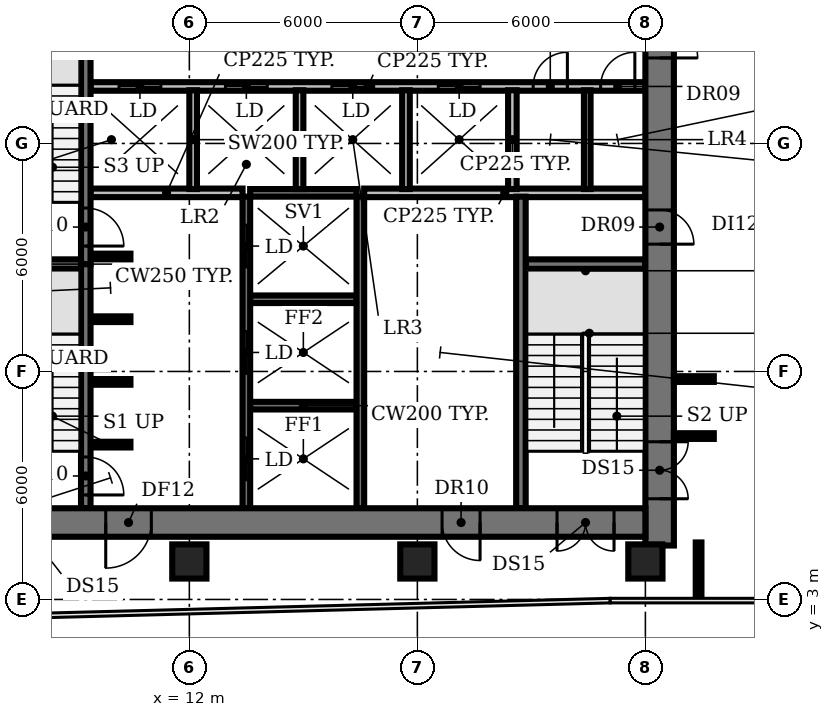
"""IFC4 building model, lengths in metres.
Left out: names, types, materials, properties, quantities, classifications, styles, units other than length and angle.
Written with IfcOpenShell. Run it as: python <this file> out.ifc"""

import sys

from ifc_helpers import new_model, si_unit, direction, frame, frame_2d, origin, origin_2d, place, context, subcontext, project, spatial, rectangle, extrude, element, fill, save


model = new_model("IFC4")
c1 = context("Model", 3, precision=1e-05, world=origin(), true_north=direction((0.0, 1.0)))
c2 = subcontext(c1, "Body", "Model", "MODEL_VIEW")
j1 = project(units=[si_unit("LENGTHUNIT", "METRE"), si_unit("PLANEANGLEUNIT", "RADIAN")], contexts=[c1])
p1 = place(None, origin())
s1 = spatial("IfcSite", under=j1, at=p1, CompositionType="ELEMENT")
p2 = place(p1, origin())
s2 = spatial("IfcBuilding", under=s1, at=p2, CompositionType="ELEMENT")
p3 = place(p2, frame((0.0, 0.0, 104.6)))
s3 = spatial("IfcBuildingStorey", under=s2, at=p3, CompositionType="ELEMENT", Elevation=104.6)
for number, where, z_axis, x_axis in (
    (1, (12.0, 4.0, 0.0), (0.0, 0.0, 1.0), (1.0, 0.0, 0.0)),
    (2, (18.0, 4.0, 0.0), (0.0, 0.0, 1.0), (1.0, 0.0, 0.0)),
    (3, (24.0, 4.0, 0.0), (0.0, 0.0, 1.0), (1.0, 0.0, 0.0)),
):
    element("IfcColumn", number, at=place(p3, frame(where, z_axis=z_axis, x_axis=x_axis)), inside=s3, PredefinedType="COLUMN", context=c2, shape_type="SweptSolid", body=[
        extrude(rectangle(XDim=0.9, YDim=0.9, at=origin_2d()), origin(), (0.0, 0.0, 1.0), 3.85),
    ])
p4 = place(p3, frame((9.4, 7.075, 0.0), z_axis=(0.0, 0.0, 1.0), x_axis=(1.0, 0.0, 0.0)))
e4 = element("IfcWall", 4, at=p4, inside=s3, PredefinedType="SHEAR", context=c2, shape_type="SweptSolid", body=[
    extrude(rectangle(XDim=1.05, YDim=0.15, at=frame_2d((0.525, 0.0))), origin(), (0.0, 0.0, 1.0), 3.85),
])
p5 = place(p3, frame((13.6, 8.1, 0.0), z_axis=(0.0, 0.0, 1.0), x_axis=(1.0, 0.0, 0.0)))
e5 = element("IfcWall", 5, at=p5, inside=s3, PredefinedType="SHEAR", context=c2, shape_type="SweptSolid", body=[
    extrude(rectangle(XDim=2.8, YDim=0.2, at=frame_2d((1.4, 0.0))), origin(), (0.0, 0.0, 1.0), 3.85),
])
for number, where, z_axis, x_axis in (
    (6, (9.4, 8.725, 0.0), (0.0, 0.0, 1.0), (1.0, 0.0, 0.0)),
    (7, (9.4, 10.375, 0.0), (0.0, 0.0, 1.0), (1.0, 0.0, 0.0)),
):
    element("IfcWall", number, at=place(p3, frame(where, z_axis=z_axis, x_axis=x_axis)), inside=s3, PredefinedType="SHEAR", context=c2, shape_type="SweptSolid", body=[
        extrude(rectangle(XDim=1.05, YDim=0.15, at=frame_2d((0.525, 0.0))), origin(), (0.0, 0.0, 1.0), 3.85),
    ])
p6 = place(p3, frame((13.6, 10.9, 0.0), z_axis=(0.0, 0.0, 1.0), x_axis=(1.0, 0.0, 0.0)))
e8 = element("IfcWall", 8, at=p6, inside=s3, PredefinedType="SHEAR", context=c2, shape_type="SweptSolid", body=[
    extrude(rectangle(XDim=2.8, YDim=0.2, at=frame_2d((1.4, 0.0))), origin(), (0.0, 0.0, 1.0), 3.85),
])
for number, where, z_axis, x_axis in (
    (9, (6.0, 11.825, 0.0), (0.0, 0.0, 1.0), (1.0, 0.0, 0.0)),
    (10, (20.85, 11.825, 0.0), (0.0, 0.0, 1.0), (1.0, 0.0, 0.0)),
):
    element("IfcWall", number, at=place(p3, frame(where, z_axis=z_axis, x_axis=x_axis)), inside=s3, PredefinedType="SHEAR", context=c2, shape_type="SweptSolid", body=[
        extrude(rectangle(XDim=3.15, YDim=0.25, at=frame_2d((1.575, 0.0))), origin(), (0.0, 0.0, 1.0), 3.85),
    ])
p7 = place(p3, frame((9.4, 12.025, 0.0), z_axis=(0.0, 0.0, 1.0), x_axis=(1.0, 0.0, 0.0)))
e11 = element("IfcWall", 11, at=p7, inside=s3, PredefinedType="SHEAR", context=c2, shape_type="SweptSolid", body=[
    extrude(rectangle(XDim=1.05, YDim=0.15, at=frame_2d((0.525, 0.0))), origin(), (0.0, 0.0, 1.0), 3.85),
])
p8 = place(p3, frame((9.4, 13.7, 0.0), z_axis=(0.0, 0.0, 1.0), x_axis=(1.0, 0.0, 0.0)))
e12 = element("IfcWall", 12, at=p8, inside=s3, PredefinedType="PARTITIONING", context=c2, shape_type="SweptSolid", body=[
    extrude(rectangle(XDim=4.0, YDim=0.225, at=frame_2d((2.0, 0.0))), origin(), (0.0, 0.0, 1.0), 3.85),
])
p9 = place(p3, frame((13.6, 13.7, 0.0), z_axis=(0.0, 0.0, 1.0), x_axis=(1.0, 0.0, 0.0)))
e13 = element("IfcWall", 13, at=p9, inside=s3, PredefinedType="SHEAR", context=c2, shape_type="SweptSolid", body=[
    extrude(rectangle(XDim=2.8, YDim=0.2, at=frame_2d((1.4, 0.0))), origin(), (0.0, 0.0, 1.0), 3.85),
])
p10 = place(p3, frame((16.6, 13.7, 0.0), z_axis=(0.0, 0.0, 1.0), x_axis=(1.0, 0.0, 0.0)))
e14 = element("IfcWall", 14, at=p10, inside=s3, PredefinedType="PARTITIONING", context=c2, shape_type="SweptSolid", body=[
    extrude(rectangle(XDim=7.4, YDim=0.225, at=frame_2d((3.7, 0.0))), origin(), (0.0, 0.0, 1.0), 3.85),
])
p11 = place(p3, frame((9.4, 16.5, 0.0), z_axis=(0.0, 0.0, 1.0), x_axis=(1.0, 0.0, 0.0)))
e15 = element("IfcWall", 15, at=p11, inside=s3, PredefinedType="PARTITIONING", context=c2, shape_type="SweptSolid", body=[
    extrude(rectangle(XDim=14.6, YDim=0.225, at=frame_2d((7.3, 0.0))), origin(), (0.0, 0.0, 1.0), 3.85),
])
p12 = place(p11, frame((0.75, 0.0, 0.0)))
e16 = element("IfcOpeningElement", 16, at=p12, cuts=e15, PredefinedType="OPENING", context=c2, shape_type="SweptSolid", body=[
    extrude(rectangle(XDim=1.1, YDim=2.1, at=frame_2d((0.55, 1.05))), frame((0.0, 0.123, 0.0), z_axis=(0.0, -1.0, 0.0), x_axis=(1.0, 0.0, 0.0)), (0.0, 0.0, 1.0), 0.245),
])
p13 = place(p11, frame((3.55, 0.0, 0.0)))
e17 = element("IfcOpeningElement", 17, at=p13, cuts=e15, PredefinedType="OPENING", context=c2, shape_type="SweptSolid", body=[
    extrude(rectangle(XDim=1.1, YDim=2.1, at=frame_2d((0.55, 1.05))), frame((0.0, 0.123, 0.0), z_axis=(0.0, -1.0, 0.0), x_axis=(1.0, 0.0, 0.0)), (0.0, 0.0, 1.0), 0.245),
])
p14 = place(p11, frame((6.35, 0.0, 0.0)))
e18 = element("IfcOpeningElement", 18, at=p14, cuts=e15, PredefinedType="OPENING", context=c2, shape_type="SweptSolid", body=[
    extrude(rectangle(XDim=1.1, YDim=2.1, at=frame_2d((0.55, 1.05))), frame((0.0, 0.123, 0.0), z_axis=(0.0, -1.0, 0.0), x_axis=(1.0, 0.0, 0.0)), (0.0, 0.0, 1.0), 0.245),
])
p15 = place(p11, frame((9.15, 0.0, 0.0)))
e19 = element("IfcOpeningElement", 19, at=p15, cuts=e15, PredefinedType="OPENING", context=c2, shape_type="SweptSolid", body=[
    extrude(rectangle(XDim=1.1, YDim=2.1, at=frame_2d((0.55, 1.05))), frame((0.0, 0.123, 0.0), z_axis=(0.0, -1.0, 0.0), x_axis=(1.0, 0.0, 0.0)), (0.0, 0.0, 1.0), 0.245),
])
p16 = place(p11, frame((11.647, 0.0, 0.0)))
e20 = element("IfcOpeningElement", 20, at=p16, cuts=e15, PredefinedType="OPENING", context=c2, shape_type="SweptSolid", body=[
    extrude(rectangle(XDim=0.9, YDim=2.1, at=frame_2d((0.45, 1.05))), frame((0.0, 0.123, 0.0), z_axis=(0.0, -1.0, 0.0), x_axis=(1.0, 0.0, 0.0)), (0.0, 0.0, 1.0), 0.245),
])
p17 = place(p11, frame((13.423, 0.0, 0.0)))
e21 = element("IfcOpeningElement", 21, at=p17, cuts=e15, PredefinedType="OPENING", context=c2, shape_type="SweptSolid", body=[
    extrude(rectangle(XDim=0.9, YDim=2.1, at=frame_2d((0.45, 1.05))), frame((0.0, 0.123, 0.0), z_axis=(0.0, -1.0, 0.0), x_axis=(1.0, 0.0, 0.0)), (0.0, 0.0, 1.0), 0.245),
])
p18 = place(p3, frame((9.275, 11.825, 0.0), z_axis=(0.0, 0.0, 1.0), x_axis=(0.0, -1.0, 0.0)))
e22 = element("IfcWall", 22, at=p18, inside=s3, PredefinedType="SHEAR", context=c2, shape_type="SweptSolid", body=[
    extrude(rectangle(XDim=6.425, YDim=0.25, at=frame_2d((3.212, 0.0))), origin(), (0.0, 0.0, 1.0), 3.85),
])
p19 = place(p18, frame((5.075, 0.0, 0.0)))
e23 = element("IfcOpeningElement", 23, at=p19, cuts=e22, PredefinedType="OPENING", context=c2, shape_type="SweptSolid", body=[
    extrude(rectangle(XDim=1.0, YDim=2.1, at=frame_2d((0.5, 1.05))), frame((0.0, 0.135, 0.0), z_axis=(0.0, -1.0, 0.0), x_axis=(1.0, 0.0, 0.0)), (0.0, 0.0, 1.0), 0.27),
])
p20 = place(p3, frame((9.275, 18.375, 0.0), z_axis=(0.0, 0.0, 1.0), x_axis=(0.0, -1.0, 0.0)))
e24 = element("IfcWall", 24, at=p20, inside=s3, PredefinedType="SHEAR", context=c2, shape_type="SweptSolid", body=[
    extrude(rectangle(XDim=6.55, YDim=0.25, at=frame_2d((3.275, 0.0))), origin(), (0.0, 0.0, 1.0), 3.85),
])
p21 = place(p20, frame((5.075, 0.0, 0.0)))
e25 = element("IfcOpeningElement", 25, at=p21, cuts=e24, PredefinedType="OPENING", context=c2, shape_type="SweptSolid", body=[
    extrude(rectangle(XDim=1.0, YDim=2.1, at=frame_2d((0.5, 1.05))), frame((0.0, 0.135, 0.0), z_axis=(0.0, -1.0, 0.0), x_axis=(1.0, 0.0, 0.0)), (0.0, 0.0, 1.0), 0.27),
])
p22 = place(p3, frame((12.1, 13.8, 0.0), z_axis=(0.0, 0.0, 1.0), x_axis=(0.0, 1.0, 0.0)))
e26 = element("IfcWall", 26, at=p22, inside=s3, PredefinedType="SOLIDWALL", context=c2, shape_type="SweptSolid", body=[
    extrude(rectangle(XDim=2.6, YDim=0.2, at=frame_2d((1.3, 0.0))), origin(), (0.0, 0.0, 1.0), 3.85),
])
p23 = place(p3, frame((13.5, 5.4, 0.0), z_axis=(0.0, 0.0, 1.0), x_axis=(0.0, 1.0, 0.0)))
e27 = element("IfcWall", 27, at=p23, inside=s3, PredefinedType="SHEAR", context=c2, shape_type="SweptSolid", body=[
    extrude(rectangle(XDim=8.2, YDim=0.2, at=frame_2d((4.1, 0.0))), origin(), (0.0, 0.0, 1.0), 3.85),
])
p24 = place(p23, frame((0.75, 0.0, 0.0)))
e28 = element("IfcOpeningElement", 28, at=p24, cuts=e27, PredefinedType="OPENING", context=c2, shape_type="SweptSolid", body=[
    extrude(rectangle(XDim=1.1, YDim=2.1, at=frame_2d((0.55, 1.05))), frame((0.0, 0.11, 0.0), z_axis=(0.0, -1.0, 0.0), x_axis=(1.0, 0.0, 0.0)), (0.0, 0.0, 1.0), 0.22),
])
p25 = place(p23, frame((3.55, 0.0, 0.0)))
e29 = element("IfcOpeningElement", 29, at=p25, cuts=e27, PredefinedType="OPENING", context=c2, shape_type="SweptSolid", body=[
    extrude(rectangle(XDim=1.1, YDim=2.1, at=frame_2d((0.55, 1.05))), frame((0.0, 0.11, 0.0), z_axis=(0.0, -1.0, 0.0), x_axis=(1.0, 0.0, 0.0)), (0.0, 0.0, 1.0), 0.22),
])
p26 = place(p23, frame((6.35, 0.0, 0.0)))
e30 = element("IfcOpeningElement", 30, at=p26, cuts=e27, PredefinedType="OPENING", context=c2, shape_type="SweptSolid", body=[
    extrude(rectangle(XDim=1.1, YDim=2.1, at=frame_2d((0.55, 1.05))), frame((0.0, 0.11, 0.0), z_axis=(0.0, -1.0, 0.0), x_axis=(1.0, 0.0, 0.0)), (0.0, 0.0, 1.0), 0.22),
])
p27 = place(p3, frame((14.9, 13.8, 0.0), z_axis=(0.0, 0.0, 1.0), x_axis=(0.0, 1.0, 0.0)))
e31 = element("IfcWall", 31, at=p27, inside=s3, PredefinedType="SOLIDWALL", context=c2, shape_type="SweptSolid", body=[
    extrude(rectangle(XDim=2.6, YDim=0.2, at=frame_2d((1.3, 0.0))), origin(), (0.0, 0.0, 1.0), 3.85),
])
p28 = place(p3, frame((16.5, 5.4, 0.0), z_axis=(0.0, 0.0, 1.0), x_axis=(0.0, 1.0, 0.0)))
e32 = element("IfcWall", 32, at=p28, inside=s3, PredefinedType="SHEAR", context=c2, shape_type="SweptSolid", body=[
    extrude(rectangle(XDim=8.2, YDim=0.2, at=frame_2d((4.1, 0.0))), origin(), (0.0, 0.0, 1.0), 3.85),
])
p29 = place(p3, frame((17.7, 13.8, 0.0), z_axis=(0.0, 0.0, 1.0), x_axis=(0.0, 1.0, 0.0)))
e33 = element("IfcWall", 33, at=p29, inside=s3, PredefinedType="SOLIDWALL", context=c2, shape_type="SweptSolid", body=[
    extrude(rectangle(XDim=2.6, YDim=0.2, at=frame_2d((1.3, 0.0))), origin(), (0.0, 0.0, 1.0), 3.85),
])
p30 = place(p3, frame((20.5, 13.8, 0.0), z_axis=(0.0, 0.0, 1.0), x_axis=(0.0, 1.0, 0.0)))
e34 = element("IfcWall", 34, at=p30, inside=s3, PredefinedType="PARTITIONING", context=c2, shape_type="SweptSolid", body=[
    extrude(rectangle(XDim=2.6, YDim=0.225, at=frame_2d((1.3, 0.0))), origin(), (0.0, 0.0, 1.0), 3.85),
])
p31 = place(p3, frame((20.725, 5.4, 0.0), z_axis=(0.0, 0.0, 1.0), x_axis=(0.0, 1.0, 0.0)))
e35 = element("IfcWall", 35, at=p31, inside=s3, PredefinedType="SHEAR", context=c2, shape_type="SweptSolid", body=[
    extrude(rectangle(XDim=8.2, YDim=0.25, at=frame_2d((4.1, 0.0))), origin(), (0.0, 0.0, 1.0), 3.85),
])
p32 = place(p3, frame((22.47, 13.8, 0.0), z_axis=(0.0, 0.0, 1.0), x_axis=(0.0, 1.0, 0.0)))
e36 = element("IfcWall", 36, at=p32, inside=s3, PredefinedType="PARTITIONING", context=c2, shape_type="SweptSolid", body=[
    extrude(rectangle(XDim=2.6, YDim=0.175, at=frame_2d((1.3, 0.0))), origin(), (0.0, 0.0, 1.0), 3.85),
])
p33 = place(p3, frame((24.375, 25.55, 0.0), z_axis=(0.0, 0.0, 1.0), x_axis=(0.0, -1.0, 0.0)))
e37 = element("IfcWall", 37, at=p33, inside=s3, PredefinedType="SHEAR", context=c2, shape_type="SweptSolid", body=[
    extrude(rectangle(XDim=21.13, YDim=0.75, at=frame_2d((10.565, 0.0))), origin(), (0.0, 0.0, 1.0), 3.85),
])
p34 = place(p33, frame((18.4, 0.0, 0.0)))
e38 = element("IfcOpeningElement", 38, at=p34, cuts=e37, PredefinedType="OPENING", context=c2, shape_type="SweptSolid", body=[
    extrude(rectangle(XDim=1.5, YDim=2.1, at=frame_2d((0.75, 1.05))), frame((0.0, 0.385, 0.0), z_axis=(0.0, -1.0, 0.0), x_axis=(1.0, 0.0, 0.0)), (0.0, 0.0, 1.0), 0.77),
])
p35 = place(p33, frame((12.3, 0.0, 0.0)))
e39 = element("IfcOpeningElement", 39, at=p35, cuts=e37, PredefinedType="OPENING", context=c2, shape_type="SweptSolid", body=[
    extrude(rectangle(XDim=0.9, YDim=2.1, at=frame_2d((0.45, 1.05))), frame((0.0, 0.385, 0.0), z_axis=(0.0, -1.0, 0.0), x_axis=(1.0, 0.0, 0.0)), (0.0, 0.0, 1.0), 0.77),
])
p36 = place(p33, frame((6.3, 0.0, 0.0)))
e40 = element("IfcOpeningElement", 40, at=p36, cuts=e37, PredefinedType="OPENING", context=c2, shape_type="SweptSolid", body=[
    extrude(rectangle(XDim=2.0, YDim=2.1, at=frame_2d((1.0, 1.05))), frame((0.0, 0.385, 0.0), z_axis=(0.0, -1.0, 0.0), x_axis=(1.0, 0.0, 0.0)), (0.0, 0.0, 1.0), 0.77),
])
p37 = place(p3, frame((24.0, 5.025, 0.0), z_axis=(0.0, 0.0, 1.0), x_axis=(-1.0, 0.0, 0.0)))
e41 = element("IfcWall", 41, at=p37, inside=s3, PredefinedType="SHEAR", context=c2, shape_type="SweptSolid", body=[
    extrude(rectangle(XDim=18.0, YDim=0.75, at=frame_2d((9.0, 0.0))), origin(), (0.0, 0.0, 1.0), 3.85),
])
p38 = place(p37, frame((0.825, 0.0, 0.0)))
e42 = element("IfcOpeningElement", 42, at=p38, cuts=e41, PredefinedType="OPENING", context=c2, shape_type="SweptSolid", body=[
    extrude(rectangle(XDim=1.5, YDim=2.1, at=frame_2d((0.75, 1.05))), frame((0.0, 0.385, 0.0), z_axis=(0.0, -1.0, 0.0), x_axis=(1.0, 0.0, 0.0)), (0.0, 0.0, 1.0), 0.77),
])
p39 = place(p37, frame((15.675, 0.0, 0.0)))
e43 = element("IfcOpeningElement", 43, at=p39, cuts=e41, PredefinedType="OPENING", context=c2, shape_type="SweptSolid", body=[
    extrude(rectangle(XDim=1.5, YDim=2.1, at=frame_2d((0.75, 1.05))), frame((0.0, 0.385, 0.0), z_axis=(0.0, -1.0, 0.0), x_axis=(1.0, 0.0, 0.0)), (0.0, 0.0, 1.0), 0.77),
])
p40 = place(p37, frame((13.0, 0.0, 0.0)))
e44 = element("IfcOpeningElement", 44, at=p40, cuts=e41, PredefinedType="OPENING", context=c2, shape_type="SweptSolid", body=[
    extrude(rectangle(XDim=1.2, YDim=2.1, at=frame_2d((0.6, 1.05))), frame((0.0, 0.385, 0.0), z_axis=(0.0, -1.0, 0.0), x_axis=(1.0, 0.0, 0.0)), (0.0, 0.0, 1.0), 0.77),
])
p41 = place(p37, frame((4.35, 0.0, 0.0)))
e45 = element("IfcOpeningElement", 45, at=p41, cuts=e41, PredefinedType="OPENING", context=c2, shape_type="SweptSolid", body=[
    extrude(rectangle(XDim=1.0, YDim=2.1, at=frame_2d((0.5, 1.05))), frame((0.0, 0.385, 0.0), z_axis=(0.0, -1.0, 0.0), x_axis=(1.0, 0.0, 0.0)), (0.0, 0.0, 1.0), 0.77),
])
for number, where, z_axis, x_axis in (
    (46, (24.75, 7.3, 0.0), (0.0, 0.0, 1.0), (1.0, 0.0, 0.0)),
    (47, (24.75, 8.8, 0.0), (0.0, 0.0, 1.0), (1.0, 0.0, 0.0)),
):
    element("IfcWall", number, at=place(p3, frame(where, z_axis=z_axis, x_axis=x_axis)), inside=s3, PredefinedType="PARTITIONING", context=c2, shape_type="SweptSolid", body=[
        extrude(rectangle(XDim=1.05, YDim=0.15, at=frame_2d((0.525, 0.0))), origin(), (0.0, 0.0, 1.0), 2.83),
    ])
p42 = place(p3, frame((25.4, 3.02, 0.0), z_axis=(0.0, 0.0, 1.0), x_axis=(0.0, 1.0, 0.0)))
e48 = element("IfcWall", 48, at=p42, inside=s3, PredefinedType="PARTITIONING", context=c2, shape_type="SweptSolid", body=[
    extrude(rectangle(XDim=1.48, YDim=0.15, at=frame_2d((0.74, 0.0))), origin(), (0.0, 0.0, 1.0), 2.83),
])
p43 = place(p12, origin())
e49 = element("IfcDoor", 49, at=p43, inside=s3, OperationType="DOUBLE_DOOR_SLIDING", PredefinedType="DOOR", context=c2, shape_type="SweptSolid", body=[
    extrude(rectangle(XDim=1.1, YDim=2.1, at=frame_2d((0.55, 1.05))), frame((0.0, 0.025, 0.0), z_axis=(0.0, -1.0, 0.0), x_axis=(1.0, 0.0, 0.0)), (0.0, 0.0, 1.0), 0.05),
])
fill(e16, e49)
p44 = place(p13, origin())
e50 = element("IfcDoor", 50, at=p44, inside=s3, OperationType="DOUBLE_DOOR_SLIDING", PredefinedType="DOOR", context=c2, shape_type="SweptSolid", body=[
    extrude(rectangle(XDim=1.1, YDim=2.1, at=frame_2d((0.55, 1.05))), frame((0.0, 0.025, 0.0), z_axis=(0.0, -1.0, 0.0), x_axis=(1.0, 0.0, 0.0)), (0.0, 0.0, 1.0), 0.05),
])
fill(e17, e50)
p45 = place(p14, origin())
e51 = element("IfcDoor", 51, at=p45, inside=s3, OperationType="DOUBLE_DOOR_SLIDING", PredefinedType="DOOR", context=c2, shape_type="SweptSolid", body=[
    extrude(rectangle(XDim=1.1, YDim=2.1, at=frame_2d((0.55, 1.05))), frame((0.0, 0.025, 0.0), z_axis=(0.0, -1.0, 0.0), x_axis=(1.0, 0.0, 0.0)), (0.0, 0.0, 1.0), 0.05),
])
fill(e18, e51)
p46 = place(p15, origin())
e52 = element("IfcDoor", 52, at=p46, inside=s3, OperationType="DOUBLE_DOOR_SLIDING", PredefinedType="DOOR", context=c2, shape_type="SweptSolid", body=[
    extrude(rectangle(XDim=1.1, YDim=2.1, at=frame_2d((0.55, 1.05))), frame((0.0, 0.025, 0.0), z_axis=(0.0, -1.0, 0.0), x_axis=(1.0, 0.0, 0.0)), (0.0, 0.0, 1.0), 0.05),
])
fill(e19, e52)
p47 = place(p16, origin())
e53 = element("IfcDoor", 53, at=p47, inside=s3, OperationType="SINGLE_SWING_RIGHT", PredefinedType="DOOR", context=c2, shape_type="SweptSolid", body=[
    extrude(rectangle(XDim=0.9, YDim=2.1, at=frame_2d((0.45, 1.05))), frame((0.0, 0.025, 0.0), z_axis=(0.0, -1.0, 0.0), x_axis=(1.0, 0.0, 0.0)), (0.0, 0.0, 1.0), 0.05),
])
fill(e20, e53)
p48 = place(p17, origin())
e54 = element("IfcDoor", 54, at=p48, inside=s3, OperationType="SINGLE_SWING_RIGHT", PredefinedType="DOOR", context=c2, shape_type="SweptSolid", body=[
    extrude(rectangle(XDim=0.9, YDim=2.1, at=frame_2d((0.45, 1.05))), frame((0.0, 0.025, 0.0), z_axis=(0.0, -1.0, 0.0), x_axis=(1.0, 0.0, 0.0)), (0.0, 0.0, 1.0), 0.05),
])
fill(e21, e54)
p49 = place(p19, origin())
e55 = element("IfcDoor", 55, at=p49, inside=s3, OperationType="SINGLE_SWING_RIGHT", PredefinedType="DOOR", context=c2, shape_type="SweptSolid", body=[
    extrude(rectangle(XDim=1.0, YDim=2.1, at=frame_2d((0.5, 1.05))), frame((0.0, 0.025, 0.0), z_axis=(0.0, -1.0, 0.0), x_axis=(1.0, 0.0, 0.0)), (0.0, 0.0, 1.0), 0.05),
])
fill(e23, e55)
p50 = place(p21, origin())
e56 = element("IfcDoor", 56, at=p50, inside=s3, OperationType="SINGLE_SWING_RIGHT", PredefinedType="DOOR", context=c2, shape_type="SweptSolid", body=[
    extrude(rectangle(XDim=1.0, YDim=2.1, at=frame_2d((0.5, 1.05))), frame((0.0, 0.025, 0.0), z_axis=(0.0, -1.0, 0.0), x_axis=(1.0, 0.0, 0.0)), (0.0, 0.0, 1.0), 0.05),
])
fill(e25, e56)
p51 = place(p24, origin())
e57 = element("IfcDoor", 57, at=p51, inside=s3, OperationType="DOUBLE_DOOR_SLIDING", PredefinedType="DOOR", context=c2, shape_type="SweptSolid", body=[
    extrude(rectangle(XDim=1.1, YDim=2.1, at=frame_2d((0.55, 1.05))), frame((0.0, 0.025, 0.0), z_axis=(0.0, -1.0, 0.0), x_axis=(1.0, 0.0, 0.0)), (0.0, 0.0, 1.0), 0.05),
])
fill(e28, e57)
p52 = place(p25, origin())
e58 = element("IfcDoor", 58, at=p52, inside=s3, OperationType="DOUBLE_DOOR_SLIDING", PredefinedType="DOOR", context=c2, shape_type="SweptSolid", body=[
    extrude(rectangle(XDim=1.1, YDim=2.1, at=frame_2d((0.55, 1.05))), frame((0.0, 0.025, 0.0), z_axis=(0.0, -1.0, 0.0), x_axis=(1.0, 0.0, 0.0)), (0.0, 0.0, 1.0), 0.05),
])
fill(e29, e58)
p53 = place(p26, origin())
e59 = element("IfcDoor", 59, at=p53, inside=s3, OperationType="DOUBLE_DOOR_SLIDING", PredefinedType="DOOR", context=c2, shape_type="SweptSolid", body=[
    extrude(rectangle(XDim=1.1, YDim=2.1, at=frame_2d((0.55, 1.05))), frame((0.0, 0.025, 0.0), z_axis=(0.0, -1.0, 0.0), x_axis=(1.0, 0.0, 0.0)), (0.0, 0.0, 1.0), 0.05),
])
fill(e30, e59)
p54 = place(p34, origin())
e60 = element("IfcDoor", 60, at=p54, inside=s3, OperationType="DOUBLE_DOOR_SINGLE_SWING", PredefinedType="DOOR", context=c2, shape_type="SweptSolid", body=[
    extrude(rectangle(XDim=1.5, YDim=2.1, at=frame_2d((0.75, 1.05))), frame((0.0, 0.025, 0.0), z_axis=(0.0, -1.0, 0.0), x_axis=(1.0, 0.0, 0.0)), (0.0, 0.0, 1.0), 0.05),
])
fill(e38, e60)
p55 = place(p35, origin())
e61 = element("IfcDoor", 61, at=p55, inside=s3, OperationType="SINGLE_SWING_RIGHT", PredefinedType="DOOR", context=c2, shape_type="SweptSolid", body=[
    extrude(rectangle(XDim=0.9, YDim=2.1, at=frame_2d((0.45, 1.05))), frame((0.0, -0.315, 0.0), z_axis=(0.0, -1.0, 0.0), x_axis=(1.0, 0.0, 0.0)), (0.0, 0.0, 1.0), 0.05),
])
fill(e39, e61)
p56 = place(p36, origin())
e62 = element("IfcDoor", 62, at=p56, inside=s3, OperationType="DOUBLE_DOOR_SINGLE_SWING", PredefinedType="DOOR", context=c2, shape_type="SweptSolid", body=[
    extrude(rectangle(XDim=2.0, YDim=2.1, at=frame_2d((1.0, 1.05))), frame((0.0, 0.025, 0.0), z_axis=(0.0, -1.0, 0.0), x_axis=(1.0, 0.0, 0.0)), (0.0, 0.0, 1.0), 0.05),
])
fill(e40, e62)
p57 = place(p38, origin())
e63 = element("IfcDoor", 63, at=p57, inside=s3, OperationType="DOUBLE_DOOR_SINGLE_SWING", PredefinedType="DOOR", context=c2, shape_type="SweptSolid", body=[
    extrude(rectangle(XDim=1.5, YDim=2.1, at=frame_2d((0.75, 1.05))), frame((0.0, 0.025, 0.0), z_axis=(0.0, -1.0, 0.0), x_axis=(1.0, 0.0, 0.0)), (0.0, 0.0, 1.0), 0.05),
])
fill(e42, e63)
p58 = place(p40, origin())
e64 = element("IfcDoor", 64, at=p58, inside=s3, OperationType="SINGLE_SWING_RIGHT", PredefinedType="DOOR", context=c2, shape_type="SweptSolid", body=[
    extrude(rectangle(XDim=1.2, YDim=2.1, at=frame_2d((0.6, 1.05))), frame((0.0, 0.025, 0.0), z_axis=(0.0, -1.0, 0.0), x_axis=(1.0, 0.0, 0.0)), (0.0, 0.0, 1.0), 0.05),
])
fill(e44, e64)
p59 = place(p41, origin())
e65 = element("IfcDoor", 65, at=p59, inside=s3, OperationType="SINGLE_SWING_LEFT", PredefinedType="DOOR", context=c2, shape_type="SweptSolid", body=[
    extrude(rectangle(XDim=1.0, YDim=2.1, at=frame_2d((0.5, 1.05))), frame((0.0, -0.315, 0.0), z_axis=(0.0, -1.0, 0.0), x_axis=(1.0, 0.0, 0.0)), (0.0, 0.0, 1.0), 0.05),
])
fill(e45, e65)
save(model, sys.argv[1])
